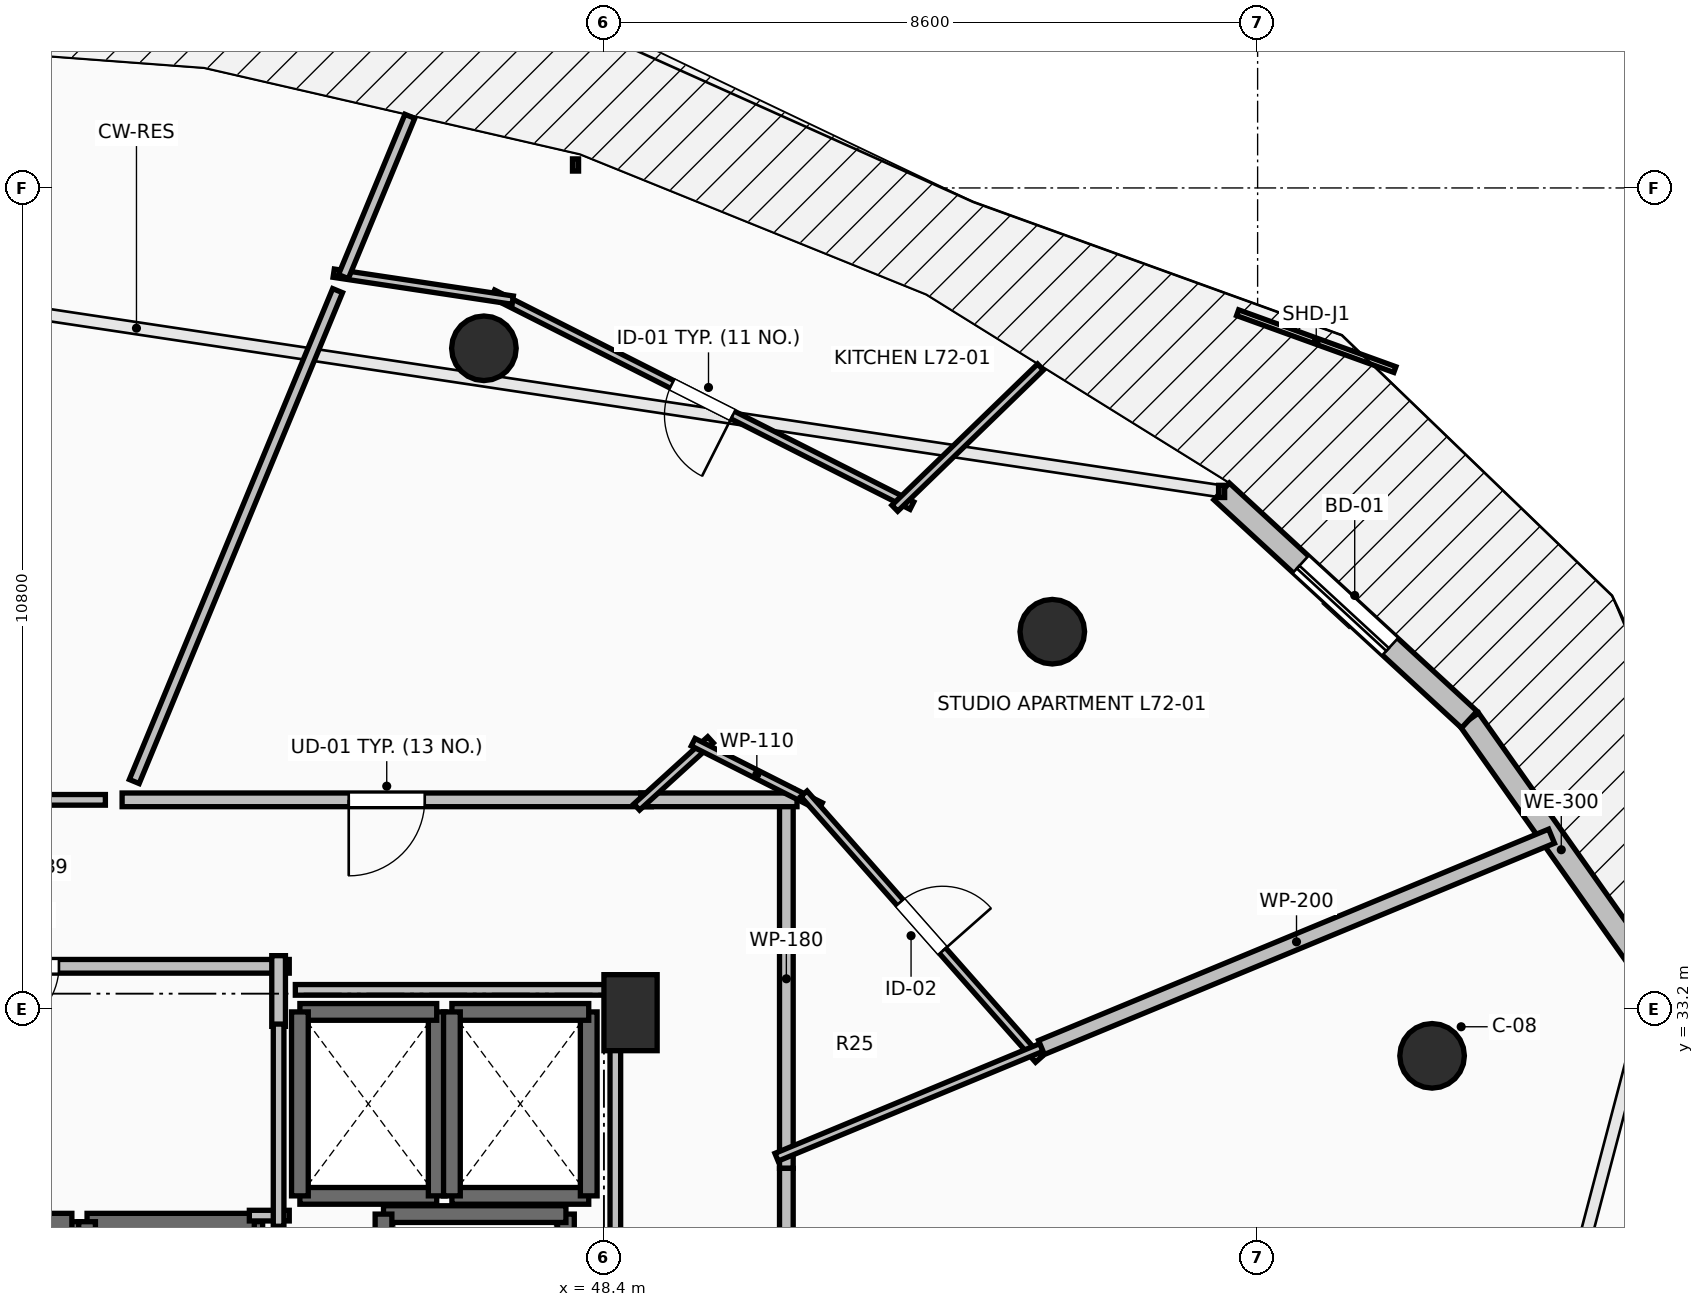
"""IFC4 building model, lengths in metres.
Left out: names, types, materials, properties, quantities, classifications, styles, units other than length and angle.
Written with IfcOpenShell. Run it as: python <this file> out.ifc"""

import sys

from ifc_helpers import new_model, si_unit, direction, frame, frame_2d, origin, origin_2d, place, context, subcontext, project, spatial, rectangle, circle, extrude, element, fill, save


model = new_model("IFC4")
c1 = context("Model", 3, precision=1e-05, world=origin(), true_north=direction((0.0, 1.0)))
c2 = subcontext(c1, "Body", "Model", "MODEL_VIEW")
j1 = project(units=[si_unit("LENGTHUNIT", "METRE"), si_unit("PLANEANGLEUNIT", "RADIAN")], contexts=[c1])
p1 = place(None, origin())
s1 = spatial("IfcSite", under=j1, at=p1, CompositionType="ELEMENT")
p2 = place(p1, origin())
s2 = spatial("IfcBuilding", under=s1, at=p2, CompositionType="ELEMENT")
p3 = place(p2, frame((0.0, 0.0, 266.2)))
s3 = spatial("IfcBuildingStorey", under=s2, at=p3, CompositionType="ELEMENT", Elevation=266.2)
for number, where, z_axis, x_axis in (
    (1, (59.295, 32.582, 0.0), (0.0, 0.0, 1.0), (0.924, 0.383, 0.0)),
    (2, (54.299, 38.162, 0.0), (0.0, 0.0, 1.0), (0.707, 0.707, 0.0)),
    (3, (46.821, 41.891, 0.0), (0.0, 0.0, 1.0), (0.383, 0.924, 0.0)),
):
    element("IfcColumn", number, at=place(p3, frame(where, z_axis=z_axis, x_axis=x_axis)), inside=s3, PredefinedType="COLUMN", context=c2, shape_type="SweptSolid", body=[
        extrude(circle(Radius=0.425, at=origin_2d()), origin(), (0.0, 0.0, 1.0), 3.55),
    ])
p4 = place(p3, frame((48.75, 33.15, 0.0), z_axis=(0.0, 0.0, 1.0), x_axis=(1.0, 0.0, 0.0)))
e4 = element("IfcColumn", 4, at=p4, inside=s3, PredefinedType="PILASTER", context=c2, shape_type="SweptSolid", body=[
    extrude(rectangle(XDim=0.7, YDim=1.0, at=origin_2d()), origin(), (0.0, 0.0, 1.0), 3.55),
])
p5 = place(p3, frame((62.206, 33.581, 0.0), z_axis=(0.0, 0.0, 1.0), x_axis=(-0.577261247247, 0.816559521668, 0.0)))
e5 = element("IfcWall", 5, at=p5, inside=s3, PredefinedType="STANDARD", context=c2, shape_type="SweptSolid", body=[
    extrude(rectangle(XDim=4.194, YDim=0.3, at=frame_2d((2.097, 0.0))), origin(), (0.0, 0.0, 1.0), 3.29),
])
p6 = place(p3, frame((59.784, 37.006, 0.0), z_axis=(0.0, 0.0, 1.0), x_axis=(-0.735445373611, 0.677584018727, 0.0)))
e6 = element("IfcWall", 6, at=p6, inside=s3, PredefinedType="STANDARD", context=c2, shape_type="SweptSolid", body=[
    extrude(rectangle(XDim=4.43, YDim=0.3, at=frame_2d((2.215, 0.0))), origin(), (0.0, 0.0, 1.0), 3.29),
])
p7 = place(p6, frame((1.415, 0.0, 0.0)))
e7 = element("IfcOpeningElement", 7, at=p7, cuts=e6, PredefinedType="OPENING", context=c2, shape_type="SweptSolid", body=[
    extrude(rectangle(XDim=1.6, YDim=2.3, at=frame_2d((0.8, 1.15))), frame((0.0, 0.165, 0.0), z_axis=(0.0, -1.0, 0.0), x_axis=(1.0, 0.0, 0.0)), (0.0, 0.0, 1.0), 0.33),
])
p8 = place(p3, frame((41.4, 27.8, 0.0), z_axis=(0.0, 0.0, 1.0), x_axis=(0.0, 1.0, 0.0)))
e8 = element("IfcWall", 8, at=p8, inside=s3, PredefinedType="SOLIDWALL", context=c2, shape_type="SweptSolid", body=[
    extrude(rectangle(XDim=2.6, YDim=0.22, at=frame_2d((1.3, 0.0))), origin(), (0.0, 0.0, 1.0), 3.29),
])
p9 = place(p3, frame((41.4, 30.4, 0.0), z_axis=(0.0, 0.0, 1.0), x_axis=(-1.0, 0.0, 0.0)))
e9 = element("IfcWall", 9, at=p9, inside=s3, PredefinedType="SOLIDWALL", context=c2, shape_type="SweptSolid", body=[
    extrude(rectangle(XDim=2.2, YDim=0.22, at=frame_2d((1.1, 0.0))), origin(), (0.0, 0.0, 1.0), 3.29),
])
p10 = place(p3, frame((43.8, 27.8, 0.0), z_axis=(0.0, 0.0, 1.0), x_axis=(0.0, 1.0, 0.0)))
e10 = element("IfcWall", 10, at=p10, inside=s3, PredefinedType="SOLIDWALL", context=c2, shape_type="SweptSolid", body=[
    extrude(rectangle(XDim=2.6, YDim=0.22, at=frame_2d((1.3, 0.0))), origin(), (0.0, 0.0, 1.0), 3.29),
])
p11 = place(p3, frame((43.8, 30.4, 0.0), z_axis=(0.0, 0.0, 1.0), x_axis=(-1.0, 0.0, 0.0)))
e11 = element("IfcWall", 11, at=p11, inside=s3, PredefinedType="SOLIDWALL", context=c2, shape_type="SweptSolid", body=[
    extrude(rectangle(XDim=2.2, YDim=0.22, at=frame_2d((1.1, 0.0))), origin(), (0.0, 0.0, 1.0), 3.29),
])
p12 = place(p3, frame((41.6, 30.4, 0.0), z_axis=(0.0, 0.0, 1.0), x_axis=(0.0, -1.0, 0.0)))
e12 = element("IfcWall", 12, at=p12, inside=s3, PredefinedType="SOLIDWALL", context=c2, shape_type="SweptSolid", body=[
    extrude(rectangle(XDim=2.6, YDim=0.22, at=frame_2d((1.3, 0.0))), origin(), (0.0, 0.0, 1.0), 3.29),
])
p13 = place(p3, frame((44.4, 30.74, 0.0), z_axis=(0.0, 0.0, 1.0), x_axis=(1.0, 0.0, 0.0)))
e13 = element("IfcWall", 13, at=p13, inside=s3, PredefinedType="SOLIDWALL", context=c2, shape_type="SweptSolid", body=[
    extrude(rectangle(XDim=1.8, YDim=0.22, at=frame_2d((0.9, 0.0))), origin(), (0.0, 0.0, 1.0), 3.29),
])
p14 = place(p3, frame((46.2, 30.74, 0.0), z_axis=(0.0, 0.0, 1.0), x_axis=(0.0, 1.0, 0.0)))
e14 = element("IfcWall", 14, at=p14, inside=s3, PredefinedType="SOLIDWALL", context=c2, shape_type="SweptSolid", body=[
    extrude(rectangle(XDim=2.42, YDim=0.22, at=frame_2d((1.21, 0.0))), origin(), (0.0, 0.0, 1.0), 3.29),
])
p15 = place(p3, frame((46.2, 33.16, 0.0), z_axis=(0.0, 0.0, 1.0), x_axis=(-1.0, 0.0, 0.0)))
e15 = element("IfcWall", 15, at=p15, inside=s3, PredefinedType="SOLIDWALL", context=c2, shape_type="SweptSolid", body=[
    extrude(rectangle(XDim=1.8, YDim=0.22, at=frame_2d((0.9, 0.0))), origin(), (0.0, 0.0, 1.0), 3.29),
])
p16 = place(p3, frame((44.4, 33.16, 0.0), z_axis=(0.0, 0.0, 1.0), x_axis=(0.0, -1.0, 0.0)))
e16 = element("IfcWall", 16, at=p16, inside=s3, PredefinedType="SOLIDWALL", context=c2, shape_type="SweptSolid", body=[
    extrude(rectangle(XDim=2.42, YDim=0.22, at=frame_2d((1.21, 0.0))), origin(), (0.0, 0.0, 1.0), 3.29),
])
p17 = place(p3, frame((46.4, 30.74, 0.0), z_axis=(0.0, 0.0, 1.0), x_axis=(1.0, 0.0, 0.0)))
e17 = element("IfcWall", 17, at=p17, inside=s3, PredefinedType="SOLIDWALL", context=c2, shape_type="SweptSolid", body=[
    extrude(rectangle(XDim=1.8, YDim=0.22, at=frame_2d((0.9, 0.0))), origin(), (0.0, 0.0, 1.0), 3.29),
])
p18 = place(p3, frame((48.2, 30.74, 0.0), z_axis=(0.0, 0.0, 1.0), x_axis=(0.0, 1.0, 0.0)))
e18 = element("IfcWall", 18, at=p18, inside=s3, PredefinedType="SOLIDWALL", context=c2, shape_type="SweptSolid", body=[
    extrude(rectangle(XDim=2.42, YDim=0.22, at=frame_2d((1.21, 0.0))), origin(), (0.0, 0.0, 1.0), 3.29),
])
p19 = place(p3, frame((48.2, 33.16, 0.0), z_axis=(0.0, 0.0, 1.0), x_axis=(-1.0, 0.0, 0.0)))
e19 = element("IfcWall", 19, at=p19, inside=s3, PredefinedType="SOLIDWALL", context=c2, shape_type="SweptSolid", body=[
    extrude(rectangle(XDim=1.8, YDim=0.22, at=frame_2d((0.9, 0.0))), origin(), (0.0, 0.0, 1.0), 3.29),
])
p20 = place(p3, frame((46.4, 33.16, 0.0), z_axis=(0.0, 0.0, 1.0), x_axis=(0.0, -1.0, 0.0)))
e20 = element("IfcWall", 20, at=p20, inside=s3, PredefinedType="SOLIDWALL", context=c2, shape_type="SweptSolid", body=[
    extrude(rectangle(XDim=2.42, YDim=0.22, at=frame_2d((1.21, 0.0))), origin(), (0.0, 0.0, 1.0), 3.29),
])
p21 = place(p3, frame((47.9, 28.0, 0.0), z_axis=(0.0, 0.0, 1.0), x_axis=(0.0, 1.0, 0.0)))
e21 = element("IfcWall", 21, at=p21, inside=s3, PredefinedType="SHEAR", context=c2, shape_type="SweptSolid", body=[
    extrude(rectangle(XDim=2.5, YDim=0.22, at=frame_2d((1.25, 0.0))), origin(), (0.0, 0.0, 1.0), 3.29),
])
p22 = place(p3, frame((47.9, 30.5, 0.0), z_axis=(0.0, 0.0, 1.0), x_axis=(-1.0, 0.0, 0.0)))
e22 = element("IfcWall", 22, at=p22, inside=s3, PredefinedType="SHEAR", context=c2, shape_type="SweptSolid", body=[
    extrude(rectangle(XDim=2.4, YDim=0.22, at=frame_2d((1.2, 0.0))), origin(), (0.0, 0.0, 1.0), 3.29),
])
p23 = place(p3, frame((45.5, 30.5, 0.0), z_axis=(0.0, 0.0, 1.0), x_axis=(0.0, -1.0, 0.0)))
e23 = element("IfcWall", 23, at=p23, inside=s3, PredefinedType="SHEAR", context=c2, shape_type="SweptSolid", body=[
    extrude(rectangle(XDim=2.5, YDim=0.22, at=frame_2d((1.25, 0.0))), origin(), (0.0, 0.0, 1.0), 3.29),
])
p24 = place(p3, frame((44.26, 33.76, 0.0), z_axis=(0.0, 0.0, 1.0), x_axis=(-1.0, 0.0, 0.0)))
e24 = element("IfcWall", 24, at=p24, inside=s3, PredefinedType="PARTITIONING", context=c2, shape_type="SweptSolid", body=[
    extrude(rectangle(XDim=6.91, YDim=0.18, at=frame_2d((3.455, 0.0))), origin(), (0.0, 0.0, 1.0), 3.29),
])
p25 = place(p24, frame((3.03, 0.0, 0.0)))
e25 = element("IfcOpeningElement", 25, at=p25, cuts=e24, PredefinedType="OPENING", context=c2, shape_type="SweptSolid", body=[
    extrude(rectangle(XDim=0.85, YDim=2.1, at=frame_2d((0.425, 1.05))), frame((0.0, 0.105, 0.0), z_axis=(0.0, -1.0, 0.0), x_axis=(1.0, 0.0, 0.0)), (0.0, 0.0, 1.0), 0.21),
])
p26 = place(p3, frame((44.12, 32.97, 0.0), z_axis=(0.0, 0.0, 1.0), x_axis=(0.0, 1.0, 0.0)))
e26 = element("IfcWall", 26, at=p26, inside=s3, PredefinedType="PARTITIONING", context=c2, shape_type="SweptSolid", body=[
    extrude(rectangle(XDim=0.93, YDim=0.18, at=frame_2d((0.465, 0.0))), origin(), (0.0, 0.0, 1.0), 3.29),
])
p27 = place(p3, frame((49.024, 35.95, 0.0), z_axis=(0.0, 0.0, 1.0), x_axis=(-1.0, 0.0, 0.0)))
e27 = element("IfcWall", 27, at=p27, inside=s3, PredefinedType="PARTITIONING", context=c2, shape_type="SweptSolid", body=[
    extrude(rectangle(XDim=6.963, YDim=0.18, at=frame_2d((3.481, 0.0))), origin(), (0.0, 0.0, 1.0), 2.482),
])
p28 = place(p27, frame((2.981, 0.0, 0.0)))
e28 = element("IfcOpeningElement", 28, at=p28, cuts=e27, PredefinedType="OPENING", context=c2, shape_type="SweptSolid", body=[
    extrude(rectangle(XDim=1.0, YDim=2.15, at=frame_2d((0.5, 1.075))), frame((0.0, 0.105, 0.0), z_axis=(0.0, -1.0, 0.0), x_axis=(1.0, 0.0, 0.0)), (0.0, 0.0, 1.0), 0.21),
])
p29 = place(p3, frame((50.8, 31.102, 0.0), z_axis=(0.0, 0.0, 1.0), x_axis=(0.0, 1.0, 0.0)))
e29 = element("IfcWall", 29, at=p29, inside=s3, PredefinedType="PARTITIONING", context=c2, shape_type="SweptSolid", body=[
    extrude(rectangle(XDim=4.988, YDim=0.18, at=frame_2d((2.494, 0.0))), origin(), (0.0, 0.0, 1.0), 2.482),
])
p30 = place(p3, frame((50.94, 35.95, 0.0), z_axis=(0.0, 0.0, 1.0), x_axis=(-1.0, 0.0, 0.0)))
e30 = element("IfcWall", 30, at=p30, inside=s3, PredefinedType="PARTITIONING", context=c2, shape_type="SweptSolid", body=[
    extrude(rectangle(XDim=2.056, YDim=0.18, at=frame_2d((1.028, 0.0))), origin(), (0.0, 0.0, 1.0), 2.979),
])
p31 = place(p3, frame((50.8, 20.758, 0.0), z_axis=(0.0, 0.0, 1.0), x_axis=(0.0, 1.0, 0.0)))
e31 = element("IfcWall", 31, at=p31, inside=s3, PredefinedType="PARTITIONING", context=c2, shape_type="SweptSolid", body=[
    extrude(rectangle(XDim=10.344, YDim=0.18, at=frame_2d((5.172, 0.0))), origin(), (0.0, 0.0, 1.0), 2.482),
])
p32 = place(p31, frame((4.672, 0.0, 0.0)))
e32 = element("IfcOpeningElement", 32, at=p32, cuts=e31, PredefinedType="OPENING", context=c2, shape_type="SweptSolid", body=[
    extrude(rectangle(XDim=1.0, YDim=2.15, at=frame_2d((0.5, 1.075))), frame((0.0, 0.105, 0.0), z_axis=(0.0, -1.0, 0.0), x_axis=(1.0, 0.0, 0.0)), (0.0, 0.0, 1.0), 0.21),
])
p33 = place(p3, frame((48.831, 35.856, 0.0), z_axis=(0.0, 0.0, 1.0), x_axis=(0.739696022243, 0.672941152463, 0.0)))
e33 = element("IfcWall", 33, at=p33, inside=s3, PredefinedType="PARTITIONING", context=c2, shape_type="SweptSolid", body=[
    extrude(rectangle(XDim=1.313, YDim=0.11, at=frame_2d((0.656, 0.0))), origin(), (0.0, 0.0, 1.0), 2.979),
])
p34 = place(p3, frame((49.574, 36.708, 0.0), z_axis=(0.0, 0.0, 1.0), x_axis=(0.8925722309, -0.450904438464, 0.0)))
e34 = element("IfcWall", 34, at=p34, inside=s3, PredefinedType="PARTITIONING", context=c2, shape_type="SweptSolid", body=[
    extrude(rectangle(XDim=1.877, YDim=0.11, at=frame_2d((0.938, 0.0))), origin(), (0.0, 0.0, 1.0), 3.29),
])
p35 = place(p3, frame((51.031, 36.03, 0.0), z_axis=(0.0, 0.0, 1.0), x_axis=(0.662106207726, -0.749410014405, 0.0)))
e35 = element("IfcWall", 35, at=p35, inside=s3, PredefinedType="PARTITIONING", context=c2, shape_type="SweptSolid", body=[
    extrude(rectangle(XDim=4.665, YDim=0.11, at=frame_2d((2.332, 0.0))), origin(), (0.0, 0.0, 1.0), 2.482),
])
p36 = place(p35, frame((1.907, 0.0, 0.0)))
e36 = element("IfcOpeningElement", 36, at=p36, cuts=e35, PredefinedType="OPENING", context=c2, shape_type="SweptSolid", body=[
    extrude(rectangle(XDim=0.85, YDim=2.1, at=frame_2d((0.425, 1.05))), frame((0.0, 0.07, 0.0), z_axis=(0.0, -1.0, 0.0), x_axis=(1.0, 0.0, 0.0)), (0.0, 0.0, 1.0), 0.14),
])
p37 = place(p3, frame((54.156, 32.693, 0.0), z_axis=(0.0, 0.0, 1.0), x_axis=(-0.923827524065, -0.382808967736, 0.0)))
e37 = element("IfcWall", 37, at=p37, inside=s3, PredefinedType="PARTITIONING", context=c2, shape_type="SweptSolid", body=[
    extrude(rectangle(XDim=3.773, YDim=0.11, at=frame_2d((1.886, 0.0))), origin(), (0.0, 0.0, 1.0), 2.482),
])
p38 = place(p3, frame((52.452, 39.821, 0.0), z_axis=(0.0, 0.0, 1.0), x_axis=(-0.89248283876, 0.451081348007, 0.0)))
e38 = element("IfcWall", 38, at=p38, inside=s3, PredefinedType="PARTITIONING", context=c2, shape_type="SweptSolid", body=[
    extrude(rectangle(XDim=6.179, YDim=0.11, at=frame_2d((3.09, 0.0))), origin(), (0.0, 0.0, 1.0), 3.29),
])
p39 = place(p38, frame((2.64, 0.0, 0.0)))
e39 = element("IfcOpeningElement", 39, at=p39, cuts=e38, PredefinedType="OPENING", context=c2, shape_type="SweptSolid", body=[
    extrude(rectangle(XDim=0.9, YDim=2.1, at=frame_2d((0.45, 1.05))), frame((0.0, 0.07, 0.0), z_axis=(0.0, -1.0, 0.0), x_axis=(1.0, 0.0, 0.0)), (0.0, 0.0, 1.0), 0.14),
])
p40 = place(p3, frame((47.2, 42.524, 0.0), z_axis=(0.0, 0.0, 1.0), x_axis=(-0.988853520249, 0.148891623308, 0.0)))
e40 = element("IfcWall", 40, at=p40, inside=s3, PredefinedType="PARTITIONING", context=c2, shape_type="SweptSolid", body=[
    extrude(rectangle(XDim=2.383, YDim=0.11, at=frame_2d((1.191, 0.0))), origin(), (0.0, 0.0, 1.0), 3.29),
])
p41 = place(p3, frame((54.144, 41.644, 0.0), z_axis=(0.0, 0.0, 1.0), x_axis=(-0.718131661866, -0.695907261225, 0.0)))
e41 = element("IfcWall", 41, at=p41, inside=s3, PredefinedType="PARTITIONING", context=c2, shape_type="SweptSolid", body=[
    extrude(rectangle(XDim=2.669, YDim=0.11, at=frame_2d((1.335, 0.0))), origin(), (0.0, 0.0, 1.0), 3.29),
])
p42 = place(p3, frame((54.156, 32.692, 0.0), z_axis=(0.0, 0.0, 1.0), x_axis=(0.923880411625, 0.382681309989, 0.0)))
e42 = element("IfcWall", 42, at=p42, inside=s3, PredefinedType="PARTITIONING", context=c2, shape_type="SweptSolid", body=[
    extrude(rectangle(XDim=7.263, YDim=0.2, at=frame_2d((3.632, 0.0))), origin(), (0.0, 0.0, 1.0), 2.482),
])
p43 = place(p3, frame((43.735, 30.48, 0.0), z_axis=(0.0, 0.0, 1.0), x_axis=(1.0, 0.0, 0.0)))
e43 = element("IfcWall", 43, at=p43, inside=s3, PredefinedType="PARTITIONING", context=c2, shape_type="SweptSolid", body=[
    extrude(rectangle(XDim=0.525, YDim=0.14, at=frame_2d((0.262, 0.0))), origin(), (0.0, 0.0, 1.0), 3.29),
])
p44 = place(p3, frame((44.12, 30.34, 0.0), z_axis=(0.0, 0.0, 1.0), x_axis=(0.0, 1.0, 0.0)))
e44 = element("IfcWall", 44, at=p44, inside=s3, PredefinedType="PARTITIONING", context=c2, shape_type="SweptSolid", body=[
    extrude(rectangle(XDim=2.66, YDim=0.14, at=frame_2d((1.33, 0.0))), origin(), (0.0, 0.0, 1.0), 3.29),
])
p45 = place(p3, frame((41.841, 35.95, 0.0), z_axis=(0.0, 0.0, 1.0), x_axis=(-1.0, 0.0, 0.0)))
e45 = element("IfcWall", 45, at=p45, inside=s3, PredefinedType="PARTITIONING", context=c2, shape_type="SweptSolid", body=[
    extrude(rectangle(XDim=2.391, YDim=0.14, at=frame_2d((1.196, 0.0))), origin(), (0.0, 0.0, 1.0), 3.29),
])
p46 = place(p3, frame((48.55, 28.196, 0.0), z_axis=(0.0, 0.0, 1.0), x_axis=(0.0, 1.0, 0.0)))
e46 = element("IfcWall", 46, at=p46, inside=s3, PredefinedType="PARTITIONING", context=c2, shape_type="SweptSolid", body=[
    extrude(rectangle(XDim=5.254, YDim=0.14, at=frame_2d((2.627, 0.0))), origin(), (0.0, 0.0, 1.0), 2.482),
])
p47 = place(p3, frame((48.55, 33.45, 0.0), z_axis=(0.0, 0.0, 1.0), x_axis=(-1.0, 0.0, 0.0)))
e47 = element("IfcWall", 47, at=p47, inside=s3, PredefinedType="PARTITIONING", context=c2, shape_type="SweptSolid", body=[
    extrude(rectangle(XDim=4.21, YDim=0.14, at=frame_2d((2.105, 0.0))), origin(), (0.0, 0.0, 1.0), 2.482),
])
p48 = place(p3, frame((44.896, 42.649, 0.0), z_axis=(0.0, 0.0, 1.0), x_axis=(-0.382690075828, -0.923876780671, 0.0)))
e48 = element("IfcWall", 48, at=p48, inside=s3, PredefinedType="PARTITIONING", context=c2, shape_type="SweptSolid", body=[
    extrude(rectangle(XDim=6.99, YDim=0.14, at=frame_2d((3.495, 0.0))), origin(), (0.0, 0.0, 1.0), 2.874),
])
p49 = place(p3, frame((45.847, 44.942, 0.0), z_axis=(0.0, 0.0, 1.0), x_axis=(-0.382997215295, -0.923749496929, 0.0)))
e49 = element("IfcWall", 49, at=p49, inside=s3, PredefinedType="PARTITIONING", context=c2, shape_type="SweptSolid", body=[
    extrude(rectangle(XDim=2.283, YDim=0.14, at=frame_2d((1.141, 0.0))), origin(), (0.0, 0.0, 1.0), 3.29),
])
p50 = place(p7, origin())
e50 = element("IfcDoor", 50, at=p50, inside=s3, OperationType="SLIDING_TO_LEFT", PredefinedType="DOOR", context=c2, shape_type="SweptSolid", body=[
    extrude(rectangle(XDim=1.6, YDim=2.3, at=frame_2d((0.8, 1.15))), frame((0.0, 0.025, 0.0), z_axis=(0.0, -1.0, 0.0), x_axis=(1.0, 0.0, 0.0)), (0.0, 0.0, 1.0), 0.05),
])
fill(e7, e50)
p51 = place(p25, origin())
e51 = element("IfcDoor", 51, at=p51, inside=s3, OperationType="SINGLE_SWING_RIGHT", PredefinedType="DOOR", context=c2, shape_type="SweptSolid", body=[
    extrude(rectangle(XDim=0.85, YDim=2.1, at=frame_2d((0.425, 1.05))), frame((0.0, 0.025, 0.0), z_axis=(0.0, -1.0, 0.0), x_axis=(1.0, 0.0, 0.0)), (0.0, 0.0, 1.0), 0.05),
])
fill(e25, e51)
p52 = place(p28, origin())
e52 = element("IfcDoor", 52, at=p52, inside=s3, OperationType="SINGLE_SWING_RIGHT", PredefinedType="DOOR", context=c2, shape_type="SweptSolid", body=[
    extrude(rectangle(XDim=1.0, YDim=2.15, at=frame_2d((0.5, 1.075))), frame((0.0, 0.025, 0.0), z_axis=(0.0, -1.0, 0.0), x_axis=(1.0, 0.0, 0.0)), (0.0, 0.0, 1.0), 0.05),
])
fill(e28, e52)
p53 = place(p36, origin())
e53 = element("IfcDoor", 53, at=p53, inside=s3, OperationType="SINGLE_SWING_RIGHT", PredefinedType="DOOR", context=c2, shape_type="SweptSolid", body=[
    extrude(rectangle(XDim=0.85, YDim=2.1, at=frame_2d((0.425, 1.05))), frame((0.0, 0.025, 0.0), z_axis=(0.0, -1.0, 0.0), x_axis=(1.0, 0.0, 0.0)), (0.0, 0.0, 1.0), 0.05),
])
fill(e36, e53)
p54 = place(p39, origin())
e54 = element("IfcDoor", 54, at=p54, inside=s3, OperationType="SINGLE_SWING_LEFT", PredefinedType="DOOR", context=c2, shape_type="SweptSolid", body=[
    extrude(rectangle(XDim=0.9, YDim=2.1, at=frame_2d((0.45, 1.05))), frame((0.0, 0.025, 0.0), z_axis=(0.0, -1.0, 0.0), x_axis=(1.0, 0.0, 0.0)), (0.0, 0.0, 1.0), 0.05),
])
fill(e39, e54)
save(model, sys.argv[1])
